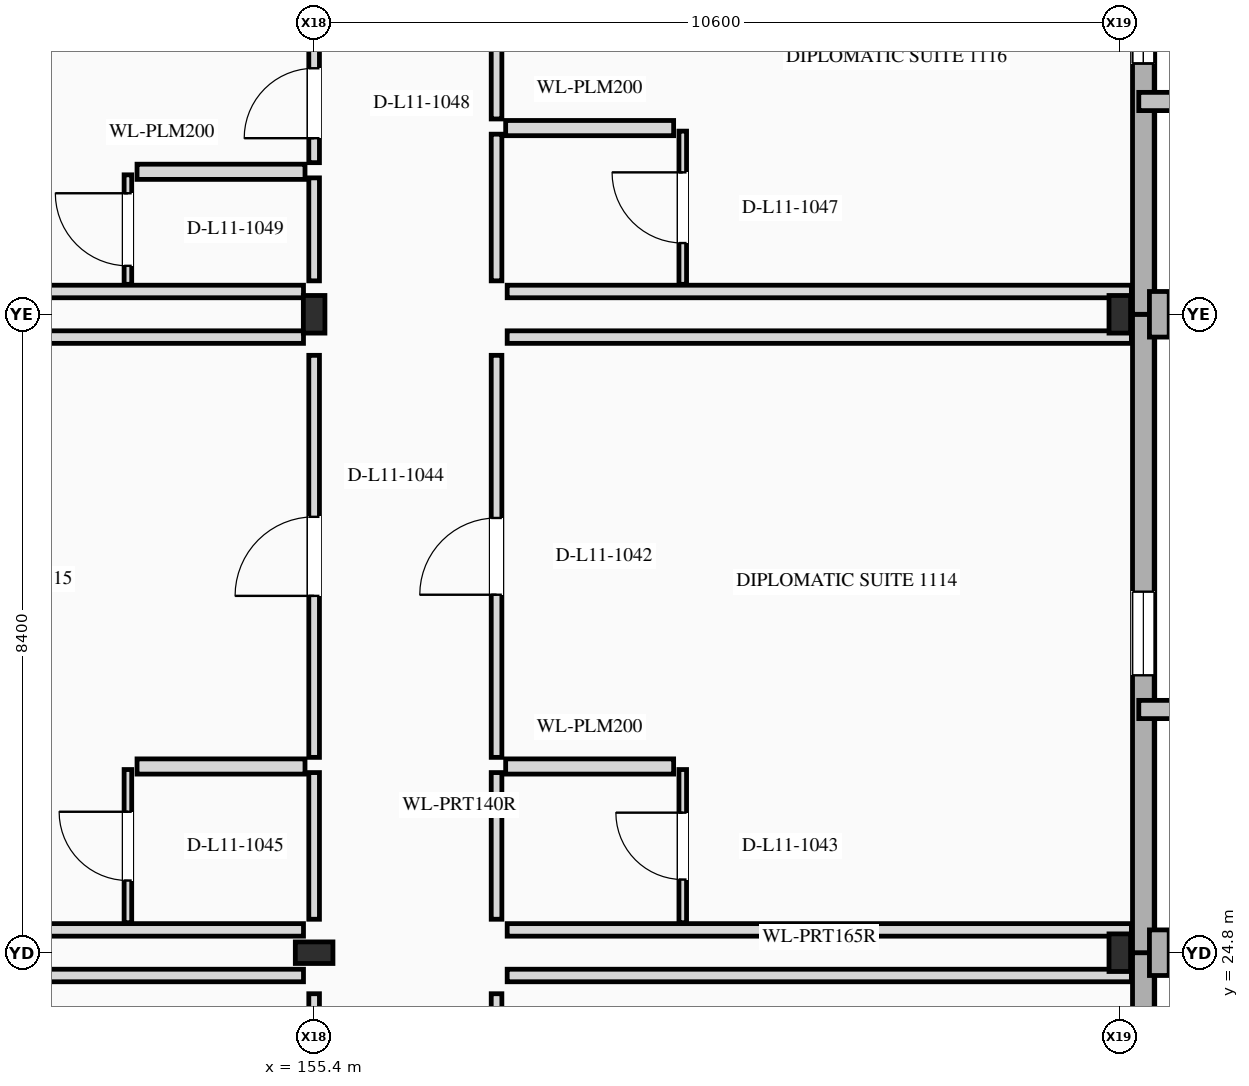
"""IFC4 building model, lengths in metres.
Left out: names, types, materials, properties, quantities, classifications, styles, units other than length and angle.
Written with IfcOpenShell. Run it as: python <this file> out.ifc"""

import sys

from ifc_helpers import new_model, si_unit, direction, frame, frame_2d, origin, origin_2d, place, context, subcontext, project, spatial, rectangle, i_section, extrude, element, fill, save


model = new_model("IFC4")
c1 = context("Model", 3, precision=1e-05, world=origin(), true_north=direction((0.0, 1.0)))
c2 = subcontext(c1, "Body", "Model", "MODEL_VIEW")
j1 = project(units=[si_unit("LENGTHUNIT", "METRE"), si_unit("PLANEANGLEUNIT", "RADIAN")], contexts=[c1])
p1 = place(None, origin())
s1 = spatial("IfcSite", under=j1, at=p1, CompositionType="ELEMENT")
p2 = place(p1, origin())
s2 = spatial("IfcBuilding", under=s1, at=p2, CompositionType="ELEMENT")
p3 = place(p2, frame((0.0, 0.0, 44.6)))
s3 = spatial("IfcBuildingStorey", under=s2, at=p3, CompositionType="ELEMENT", Elevation=44.6)
for number, where, z_axis, x_axis in (
    (1, (155.4, 24.8, 0.0), (0.0, 0.0, 1.0), (0.0, 1.0, 0.0)),
    (2, (155.4, 33.2, 0.0), (0.0, 0.0, 1.0), (1.0, 0.0, 0.0)),
    (3, (166.0, 24.8, 0.0), (0.0, 0.0, 1.0), (1.0, 0.0, 0.0)),
    (4, (166.0, 33.2, 0.0), (0.0, 0.0, 1.0), (1.0, 0.0, 0.0)),
):
    element("IfcColumn", number, at=place(p3, frame(where, z_axis=z_axis, x_axis=x_axis)), inside=s3, PredefinedType="COLUMN", context=c2, shape_type="SweptSolid", body=[
        extrude(i_section(OverallWidth=0.284, OverallDepth=0.495, WebThickness=0.019, FlangeThickness=0.033, at=origin_2d()), origin(), (0.0, 0.0, 1.0), 3.6),
    ])
p4 = place(p3, frame((166.31, 18.8, 0.0), z_axis=(0.0, 0.0, 1.0), x_axis=(0.0, 1.0, 0.0)))
e5 = element("IfcWall", 5, at=p4, inside=s3, PredefinedType="STANDARD", context=c2, shape_type="SweptSolid", body=[
    extrude(rectangle(XDim=6.0, YDim=0.285, at=frame_2d((3.0, 0.0))), origin(), (0.0, 0.0, 1.0), 3.6),
])
p5 = place(p4, frame((2.4, 0.0, 0.85)))
e6 = element("IfcOpeningElement", 6, at=p5, cuts=e5, PredefinedType="OPENING", context=c2, shape_type="SweptSolid", body=[
    extrude(rectangle(XDim=1.2, YDim=1.6, at=frame_2d((0.6, 0.8))), frame((0.0, 0.152, 0.0), z_axis=(0.0, -1.0, 0.0), x_axis=(1.0, 0.0, 0.0)), (0.0, 0.0, 1.0), 0.305),
])
p6 = place(p3, frame((166.31, 24.8, 0.0), z_axis=(0.0, 0.0, 1.0), x_axis=(0.0, 1.0, 0.0)))
e7 = element("IfcWall", 7, at=p6, inside=s3, PredefinedType="STANDARD", context=c2, shape_type="SweptSolid", body=[
    extrude(rectangle(XDim=8.4, YDim=0.285, at=frame_2d((4.2, 0.0))), origin(), (0.0, 0.0, 1.0), 3.6),
])
p7 = place(p6, frame((3.65, 0.0, 0.85)))
e8 = element("IfcOpeningElement", 8, at=p7, cuts=e7, PredefinedType="OPENING", context=c2, shape_type="SweptSolid", body=[
    extrude(rectangle(XDim=1.1, YDim=1.5, at=frame_2d((0.55, 0.75))), frame((0.0, 0.152, 0.0), z_axis=(0.0, -1.0, 0.0), x_axis=(1.0, 0.0, 0.0)), (0.0, 0.0, 1.0), 0.305),
])
p8 = place(p3, frame((166.52, 24.5, 0.0), z_axis=(0.0, 0.0, 1.0), x_axis=(0.0, 1.0, 0.0)))
e9 = element("IfcWall", 9, at=p8, inside=s3, PredefinedType="ELEMENTEDWALL", context=c2, shape_type="SweptSolid", body=[
    extrude(rectangle(XDim=0.6, YDim=0.26, at=frame_2d((0.3, 0.0))), origin(), (0.0, 0.0, 1.0), 3.6),
])
p9 = place(p3, frame((166.31, 33.2, 0.0), z_axis=(0.0, 0.0, 1.0), x_axis=(0.0, 1.0, 0.0)))
e10 = element("IfcWall", 10, at=p9, inside=s3, PredefinedType="STANDARD", context=c2, shape_type="SweptSolid", body=[
    extrude(rectangle(XDim=8.4, YDim=0.285, at=frame_2d((4.2, 0.0))), origin(), (0.0, 0.0, 1.0), 3.6),
])
p10 = place(p9, frame((3.3, 0.0, 0.85)))
e11 = element("IfcOpeningElement", 11, at=p10, cuts=e10, PredefinedType="OPENING", context=c2, shape_type="SweptSolid", body=[
    extrude(rectangle(XDim=1.8, YDim=1.8, at=frame_2d((0.9, 0.9))), frame((0.0, 0.152, 0.0), z_axis=(0.0, -1.0, 0.0), x_axis=(1.0, 0.0, 0.0)), (0.0, 0.0, 1.0), 0.305),
])
p11 = place(p3, frame((166.52, 32.9, 0.0), z_axis=(0.0, 0.0, 1.0), x_axis=(0.0, 1.0, 0.0)))
e12 = element("IfcWall", 12, at=p11, inside=s3, PredefinedType="ELEMENTEDWALL", context=c2, shape_type="SweptSolid", body=[
    extrude(rectangle(XDim=0.6, YDim=0.26, at=frame_2d((0.3, 0.0))), origin(), (0.0, 0.0, 1.0), 3.6),
])
p12 = place(p3, frame((155.4, 21.37, 0.0), z_axis=(0.0, 0.0, 1.0), x_axis=(0.0, 1.0, 0.0)))
e13 = element("IfcWall", 13, at=p12, inside=s3, PredefinedType="PARTITIONING", context=c2, shape_type="SweptSolid", body=[
    extrude(rectangle(XDim=2.89, YDim=0.14, at=frame_2d((1.445, 0.0))), origin(), (0.0, 0.0, 1.0), 2.774),
])
p13 = place(p12, frame((0.955, 0.0, 0.0)))
e14 = element("IfcOpeningElement", 14, at=p13, cuts=e13, PredefinedType="OPENING", context=c2, shape_type="SweptSolid", body=[
    extrude(rectangle(XDim=0.98, YDim=2.2, at=frame_2d((0.49, 1.1))), frame((0.0, 0.08, 0.0), z_axis=(0.0, -1.0, 0.0), x_axis=(1.0, 0.0, 0.0)), (0.0, 0.0, 1.0), 0.16),
])
p14 = place(p3, frame((147.048, 24.5, 0.0), z_axis=(0.0, 0.0, 1.0), x_axis=(1.0, 0.0, 0.0)))
e15 = element("IfcWall", 15, at=p14, inside=s3, PredefinedType="PARTITIONING", context=c2, shape_type="SweptSolid", body=[
    extrude(rectangle(XDim=8.212, YDim=0.165, at=frame_2d((4.106, 0.0))), origin(), (0.0, 0.0, 1.0), 2.713),
])
p15 = place(p3, frame((157.8, 25.24, 0.0), z_axis=(0.0, 0.0, 1.0), x_axis=(0.0, 1.0, 0.0)))
e16 = element("IfcWall", 16, at=p15, inside=s3, PredefinedType="PARTITIONING", context=c2, shape_type="SweptSolid", body=[
    extrude(rectangle(XDim=1.93, YDim=0.14, at=frame_2d((0.965, 0.0))), origin(), (0.0, 0.0, 1.0), 2.858),
])
p16 = place(p3, frame((157.8, 27.37, 0.0), z_axis=(0.0, 0.0, 1.0), x_axis=(0.0, 1.0, 0.0)))
e17 = element("IfcWall", 17, at=p16, inside=s3, PredefinedType="PARTITIONING", context=c2, shape_type="SweptSolid", body=[
    extrude(rectangle(XDim=5.29, YDim=0.14, at=frame_2d((2.645, 0.0))), origin(), (0.0, 0.0, 1.0), 2.858),
])
p17 = place(p16, frame((2.14, 0.0, 0.0)))
e18 = element("IfcOpeningElement", 18, at=p17, cuts=e17, PredefinedType="OPENING", context=c2, shape_type="SweptSolid", body=[
    extrude(rectangle(XDim=1.01, YDim=2.2, at=frame_2d((0.505, 1.1))), frame((0.0, 0.08, 0.0), z_axis=(0.0, -1.0, 0.0), x_axis=(1.0, 0.0, 0.0)), (0.0, 0.0, 1.0), 0.16),
])
for number, where, z_axis, x_axis in (
    (19, (157.94, 25.1, 0.0), (0.0, 0.0, 1.0), (1.0, 0.0, 0.0)),
    (20, (157.94, 32.9, 0.0), (0.0, 0.0, 1.0), (1.0, 0.0, 0.0)),
):
    element("IfcWall", number, at=place(p3, frame(where, z_axis=z_axis, x_axis=x_axis)), inside=s3, PredefinedType="PARTITIONING", context=c2, shape_type="SweptSolid", body=[
        extrude(rectangle(XDim=8.213, YDim=0.165, at=frame_2d((4.106, 0.0))), origin(), (0.0, 0.0, 1.0), 2.69),
    ])
p18 = place(p3, frame((157.92, 27.25, 0.0), z_axis=(0.0, 0.0, 1.0), x_axis=(1.0, 0.0, 0.0)))
e21 = element("IfcWall", 21, at=p18, inside=s3, PredefinedType="PLUMBINGWALL", context=c2, shape_type="SweptSolid", body=[
    extrude(rectangle(XDim=2.21, YDim=0.2, at=frame_2d((1.105, 0.0))), origin(), (0.0, 0.0, 1.0), 3.3),
])
p19 = place(p3, frame((160.25, 25.195, 0.0), z_axis=(0.0, 0.0, 1.0), x_axis=(0.0, 1.0, 0.0)))
e22 = element("IfcWall", 22, at=p19, inside=s3, PredefinedType="PARTITIONING", context=c2, shape_type="SweptSolid", body=[
    extrude(rectangle(XDim=2.015, YDim=0.1, at=frame_2d((1.008, 0.0))), origin(), (0.0, 0.0, 1.0), 2.858),
])
p20 = place(p19, frame((0.568, 0.0, 0.0)))
e23 = element("IfcOpeningElement", 23, at=p20, cuts=e22, PredefinedType="OPENING", context=c2, shape_type="SweptSolid", body=[
    extrude(rectangle(XDim=0.88, YDim=2.1, at=frame_2d((0.44, 1.05))), frame((0.0, 0.06, 0.0), z_axis=(0.0, -1.0, 0.0), x_axis=(1.0, 0.0, 0.0)), (0.0, 0.0, 1.0), 0.12),
])
p21 = place(p3, frame((155.4, 25.24, 0.0), z_axis=(0.0, 0.0, 1.0), x_axis=(0.0, 1.0, 0.0)))
e24 = element("IfcWall", 24, at=p21, inside=s3, PredefinedType="PARTITIONING", context=c2, shape_type="SweptSolid", body=[
    extrude(rectangle(XDim=1.93, YDim=0.14, at=frame_2d((0.965, 0.0))), origin(), (0.0, 0.0, 1.0), 2.774),
])
p22 = place(p3, frame((155.4, 27.37, 0.0), z_axis=(0.0, 0.0, 1.0), x_axis=(0.0, 1.0, 0.0)))
e25 = element("IfcWall", 25, at=p22, inside=s3, PredefinedType="PARTITIONING", context=c2, shape_type="SweptSolid", body=[
    extrude(rectangle(XDim=5.29, YDim=0.14, at=frame_2d((2.645, 0.0))), origin(), (0.0, 0.0, 1.0), 2.774),
])
p23 = place(p22, frame((2.125, 0.0, 0.0)))
e26 = element("IfcOpeningElement", 26, at=p23, cuts=e25, PredefinedType="OPENING", context=c2, shape_type="SweptSolid", body=[
    extrude(rectangle(XDim=1.04, YDim=2.25, at=frame_2d((0.52, 1.125))), frame((0.0, 0.08, 0.0), z_axis=(0.0, -1.0, 0.0), x_axis=(1.0, 0.0, 0.0)), (0.0, 0.0, 1.0), 0.16),
])
for number, where, z_axis, x_axis in (
    (27, (147.048, 25.1, 0.0), (0.0, 0.0, 1.0), (1.0, 0.0, 0.0)),
    (28, (147.048, 32.9, 0.0), (0.0, 0.0, 1.0), (1.0, 0.0, 0.0)),
):
    element("IfcWall", number, at=place(p3, frame(where, z_axis=z_axis, x_axis=x_axis)), inside=s3, PredefinedType="PARTITIONING", context=c2, shape_type="SweptSolid", body=[
        extrude(rectangle(XDim=8.212, YDim=0.165, at=frame_2d((4.106, 0.0))), origin(), (0.0, 0.0, 1.0), 2.713),
    ])
p24 = place(p3, frame((153.07, 27.25, 0.0), z_axis=(0.0, 0.0, 1.0), x_axis=(1.0, 0.0, 0.0)))
e29 = element("IfcWall", 29, at=p24, inside=s3, PredefinedType="PLUMBINGWALL", context=c2, shape_type="SweptSolid", body=[
    extrude(rectangle(XDim=2.21, YDim=0.2, at=frame_2d((1.105, 0.0))), origin(), (0.0, 0.0, 1.0), 3.3),
])
p25 = place(p3, frame((152.95, 25.195, 0.0), z_axis=(0.0, 0.0, 1.0), x_axis=(0.0, 1.0, 0.0)))
e30 = element("IfcWall", 30, at=p25, inside=s3, PredefinedType="PARTITIONING", context=c2, shape_type="SweptSolid", body=[
    extrude(rectangle(XDim=2.015, YDim=0.1, at=frame_2d((1.008, 0.0))), origin(), (0.0, 0.0, 1.0), 2.908),
])
p26 = place(p25, frame((0.555, 0.0, 0.0)))
e31 = element("IfcOpeningElement", 31, at=p26, cuts=e30, PredefinedType="OPENING", context=c2, shape_type="SweptSolid", body=[
    extrude(rectangle(XDim=0.905, YDim=2.1, at=frame_2d((0.453, 1.05))), frame((0.0, 0.06, 0.0), z_axis=(0.0, -1.0, 0.0), x_axis=(1.0, 0.0, 0.0)), (0.0, 0.0, 1.0), 0.12),
])
p27 = place(p3, frame((157.8, 33.64, 0.0), z_axis=(0.0, 0.0, 1.0), x_axis=(0.0, 1.0, 0.0)))
e32 = element("IfcWall", 32, at=p27, inside=s3, PredefinedType="PARTITIONING", context=c2, shape_type="SweptSolid", body=[
    extrude(rectangle(XDim=1.93, YDim=0.14, at=frame_2d((0.965, 0.0))), origin(), (0.0, 0.0, 1.0), 3.3),
])
p28 = place(p3, frame((157.8, 35.77, 0.0), z_axis=(0.0, 0.0, 1.0), x_axis=(0.0, 1.0, 0.0)))
e33 = element("IfcWall", 33, at=p28, inside=s3, PredefinedType="PARTITIONING", context=c2, shape_type="SweptSolid", body=[
    extrude(rectangle(XDim=5.29, YDim=0.14, at=frame_2d((2.645, 0.0))), origin(), (0.0, 0.0, 1.0), 3.3),
])
p29 = place(p28, frame((2.11, 0.0, 0.0)))
e34 = element("IfcOpeningElement", 34, at=p29, cuts=e33, PredefinedType="OPENING", context=c2, shape_type="SweptSolid", body=[
    extrude(rectangle(XDim=1.07, YDim=2.25, at=frame_2d((0.535, 1.125))), frame((0.0, 0.08, 0.0), z_axis=(0.0, -1.0, 0.0), x_axis=(1.0, 0.0, 0.0)), (0.0, 0.0, 1.0), 0.16),
])
p30 = place(p3, frame((157.94, 33.5, 0.0), z_axis=(0.0, 0.0, 1.0), x_axis=(1.0, 0.0, 0.0)))
e35 = element("IfcWall", 35, at=p30, inside=s3, PredefinedType="PARTITIONING", context=c2, shape_type="SweptSolid", body=[
    extrude(rectangle(XDim=8.213, YDim=0.165, at=frame_2d((4.106, 0.0))), origin(), (0.0, 0.0, 1.0), 2.69),
])
p31 = place(p3, frame((157.92, 35.65, 0.0), z_axis=(0.0, 0.0, 1.0), x_axis=(1.0, 0.0, 0.0)))
e36 = element("IfcWall", 36, at=p31, inside=s3, PredefinedType="PLUMBINGWALL", context=c2, shape_type="SweptSolid", body=[
    extrude(rectangle(XDim=2.21, YDim=0.2, at=frame_2d((1.105, 0.0))), origin(), (0.0, 0.0, 1.0), 3.3),
])
p32 = place(p3, frame((160.25, 33.594, 0.0), z_axis=(0.0, 0.0, 1.0), x_axis=(0.0, 1.0, 0.0)))
e37 = element("IfcWall", 37, at=p32, inside=s3, PredefinedType="PARTITIONING", context=c2, shape_type="SweptSolid", body=[
    extrude(rectangle(XDim=2.016, YDim=0.1, at=frame_2d((1.008, 0.0))), origin(), (0.0, 0.0, 1.0), 3.3),
])
p33 = place(p32, frame((0.543, 0.0, 0.0)))
e38 = element("IfcOpeningElement", 38, at=p33, cuts=e37, PredefinedType="OPENING", context=c2, shape_type="SweptSolid", body=[
    extrude(rectangle(XDim=0.93, YDim=2.14, at=frame_2d((0.465, 1.07))), frame((0.0, 0.06, 0.0), z_axis=(0.0, -1.0, 0.0), x_axis=(1.0, 0.0, 0.0)), (0.0, 0.0, 1.0), 0.12),
])
p34 = place(p3, frame((155.4, 33.64, 0.0), z_axis=(0.0, 0.0, 1.0), x_axis=(0.0, 1.0, 0.0)))
e39 = element("IfcWall", 39, at=p34, inside=s3, PredefinedType="PARTITIONING", context=c2, shape_type="SweptSolid", body=[
    extrude(rectangle(XDim=1.355, YDim=0.14, at=frame_2d((0.678, 0.0))), origin(), (0.0, 0.0, 1.0), 3.3),
])
p35 = place(p3, frame((155.4, 35.195, 0.0), z_axis=(0.0, 0.0, 1.0), x_axis=(0.0, 1.0, 0.0)))
e40 = element("IfcWall", 40, at=p35, inside=s3, PredefinedType="PARTITIONING", context=c2, shape_type="SweptSolid", body=[
    extrude(rectangle(XDim=1.565, YDim=0.14, at=frame_2d((0.782, 0.0))), origin(), (0.0, 0.0, 1.0), 3.3),
])
p36 = place(p35, frame((0.322, 0.0, 0.0)))
e41 = element("IfcOpeningElement", 41, at=p36, cuts=e40, PredefinedType="OPENING", context=c2, shape_type="SweptSolid", body=[
    extrude(rectangle(XDim=0.92, YDim=2.3, at=frame_2d((0.46, 1.15))), frame((0.0, 0.08, 0.0), z_axis=(0.0, -1.0, 0.0), x_axis=(1.0, 0.0, 0.0)), (0.0, 0.0, 1.0), 0.16),
])
p37 = place(p3, frame((147.048, 33.5, 0.0), z_axis=(0.0, 0.0, 1.0), x_axis=(1.0, 0.0, 0.0)))
e42 = element("IfcWall", 42, at=p37, inside=s3, PredefinedType="PARTITIONING", context=c2, shape_type="SweptSolid", body=[
    extrude(rectangle(XDim=8.212, YDim=0.165, at=frame_2d((4.106, 0.0))), origin(), (0.0, 0.0, 1.0), 2.713),
])
p38 = place(p3, frame((153.07, 35.075, 0.0), z_axis=(0.0, 0.0, 1.0), x_axis=(1.0, 0.0, 0.0)))
e43 = element("IfcWall", 43, at=p38, inside=s3, PredefinedType="PLUMBINGWALL", context=c2, shape_type="SweptSolid", body=[
    extrude(rectangle(XDim=2.21, YDim=0.2, at=frame_2d((1.105, 0.0))), origin(), (0.0, 0.0, 1.0), 3.3),
])
p39 = place(p3, frame((152.95, 33.594, 0.0), z_axis=(0.0, 0.0, 1.0), x_axis=(0.0, 1.0, 0.0)))
e44 = element("IfcWall", 44, at=p39, inside=s3, PredefinedType="PARTITIONING", context=c2, shape_type="SweptSolid", body=[
    extrude(rectangle(XDim=1.44, YDim=0.1, at=frame_2d((0.72, 0.0))), origin(), (0.0, 0.0, 1.0), 3.3),
])
p40 = place(p39, frame((0.243, 0.0, 0.0)))
e45 = element("IfcOpeningElement", 45, at=p40, cuts=e44, PredefinedType="OPENING", context=c2, shape_type="SweptSolid", body=[
    extrude(rectangle(XDim=0.955, YDim=2.14, at=frame_2d((0.478, 1.07))), frame((0.0, 0.06, 0.0), z_axis=(0.0, -1.0, 0.0), x_axis=(1.0, 0.0, 0.0)), (0.0, 0.0, 1.0), 0.12),
])
p41 = place(p3, frame((157.8, 19.34, 0.0), z_axis=(0.0, 0.0, 1.0), x_axis=(0.0, 1.0, 0.0)))
e46 = element("IfcWall", 46, at=p41, inside=s3, PredefinedType="PARTITIONING", context=c2, shape_type="SweptSolid", body=[
    extrude(rectangle(XDim=4.92, YDim=0.14, at=frame_2d((2.46, 0.0))), origin(), (0.0, 0.0, 1.0), 2.858),
])
p42 = place(p41, frame((1.925, 0.0, 0.0)))
e47 = element("IfcOpeningElement", 47, at=p42, cuts=e46, PredefinedType="OPENING", context=c2, shape_type="SweptSolid", body=[
    extrude(rectangle(XDim=1.07, YDim=2.4, at=frame_2d((0.535, 1.2))), frame((0.0, 0.08, 0.0), z_axis=(0.0, -1.0, 0.0), x_axis=(1.0, 0.0, 0.0)), (0.0, 0.0, 1.0), 0.16),
])
p43 = place(p3, frame((157.94, 24.5, 0.0), z_axis=(0.0, 0.0, 1.0), x_axis=(1.0, 0.0, 0.0)))
e48 = element("IfcWall", 48, at=p43, inside=s3, PredefinedType="PARTITIONING", context=c2, shape_type="SweptSolid", body=[
    extrude(rectangle(XDim=8.213, YDim=0.165, at=frame_2d((4.106, 0.0))), origin(), (0.0, 0.0, 1.0), 2.69),
])
p44 = place(p7, origin())
e49 = element("IfcWindow", 49, at=p44, inside=s3, PartitioningType="SINGLE_PANEL", PredefinedType="WINDOW", context=c2, shape_type="SweptSolid", body=[
    extrude(rectangle(XDim=1.1, YDim=1.5, at=frame_2d((0.55, 0.75))), frame((0.0, 0.03, 0.0), z_axis=(0.0, -1.0, 0.0), x_axis=(1.0, 0.0, 0.0)), (0.0, 0.0, 1.0), 0.06),
])
fill(e8, e49)
p45 = place(p10, origin())
e50 = element("IfcWindow", 50, at=p45, inside=s3, PartitioningType="SINGLE_PANEL", PredefinedType="WINDOW", context=c2, shape_type="SweptSolid", body=[
    extrude(rectangle(XDim=1.8, YDim=1.8, at=frame_2d((0.9, 0.9))), frame((0.0, 0.03, 0.0), z_axis=(0.0, -1.0, 0.0), x_axis=(1.0, 0.0, 0.0)), (0.0, 0.0, 1.0), 0.06),
])
fill(e11, e50)
p46 = place(p17, origin())
e51 = element("IfcDoor", 51, at=p46, inside=s3, OperationType="SINGLE_SWING_LEFT", PredefinedType="DOOR", context=c2, shape_type="SweptSolid", body=[
    extrude(rectangle(XDim=1.01, YDim=2.2, at=frame_2d((0.505, 1.1))), frame((0.0, 0.025, 0.0), z_axis=(0.0, -1.0, 0.0), x_axis=(1.0, 0.0, 0.0)), (0.0, 0.0, 1.0), 0.05),
])
fill(e18, e51)
p47 = place(p20, origin())
e52 = element("IfcDoor", 52, at=p47, inside=s3, OperationType="SINGLE_SWING_RIGHT", PredefinedType="DOOR", context=c2, shape_type="SweptSolid", body=[
    extrude(rectangle(XDim=0.88, YDim=2.1, at=frame_2d((0.44, 1.05))), frame((0.0, 0.025, 0.0), z_axis=(0.0, -1.0, 0.0), x_axis=(1.0, 0.0, 0.0)), (0.0, 0.0, 1.0), 0.05),
])
fill(e23, e52)
p48 = place(p23, origin())
e53 = element("IfcDoor", 53, at=p48, inside=s3, OperationType="SINGLE_SWING_LEFT", PredefinedType="DOOR", context=c2, shape_type="SweptSolid", body=[
    extrude(rectangle(XDim=1.04, YDim=2.25, at=frame_2d((0.52, 1.125))), frame((0.0, 0.025, 0.0), z_axis=(0.0, -1.0, 0.0), x_axis=(1.0, 0.0, 0.0)), (0.0, 0.0, 1.0), 0.05),
])
fill(e26, e53)
p49 = place(p26, origin())
e54 = element("IfcDoor", 54, at=p49, inside=s3, OperationType="SINGLE_SWING_RIGHT", PredefinedType="DOOR", context=c2, shape_type="SweptSolid", body=[
    extrude(rectangle(XDim=0.905, YDim=2.1, at=frame_2d((0.453, 1.05))), frame((0.0, 0.025, 0.0), z_axis=(0.0, -1.0, 0.0), x_axis=(1.0, 0.0, 0.0)), (0.0, 0.0, 1.0), 0.05),
])
fill(e31, e54)
p50 = place(p33, origin())
e55 = element("IfcDoor", 55, at=p50, inside=s3, OperationType="SINGLE_SWING_RIGHT", PredefinedType="DOOR", context=c2, shape_type="SweptSolid", body=[
    extrude(rectangle(XDim=0.93, YDim=2.14, at=frame_2d((0.465, 1.07))), frame((0.0, 0.025, 0.0), z_axis=(0.0, -1.0, 0.0), x_axis=(1.0, 0.0, 0.0)), (0.0, 0.0, 1.0), 0.05),
])
fill(e38, e55)
p51 = place(p36, origin())
e56 = element("IfcDoor", 56, at=p51, inside=s3, OperationType="SINGLE_SWING_LEFT", PredefinedType="DOOR", context=c2, shape_type="SweptSolid", body=[
    extrude(rectangle(XDim=0.92, YDim=2.3, at=frame_2d((0.46, 1.15))), frame((0.0, 0.025, 0.0), z_axis=(0.0, -1.0, 0.0), x_axis=(1.0, 0.0, 0.0)), (0.0, 0.0, 1.0), 0.05),
])
fill(e41, e56)
p52 = place(p40, origin())
e57 = element("IfcDoor", 57, at=p52, inside=s3, OperationType="SINGLE_SWING_RIGHT", PredefinedType="DOOR", context=c2, shape_type="SweptSolid", body=[
    extrude(rectangle(XDim=0.955, YDim=2.14, at=frame_2d((0.478, 1.07))), frame((0.0, 0.025, 0.0), z_axis=(0.0, -1.0, 0.0), x_axis=(1.0, 0.0, 0.0)), (0.0, 0.0, 1.0), 0.05),
])
fill(e45, e57)
save(model, sys.argv[1])
